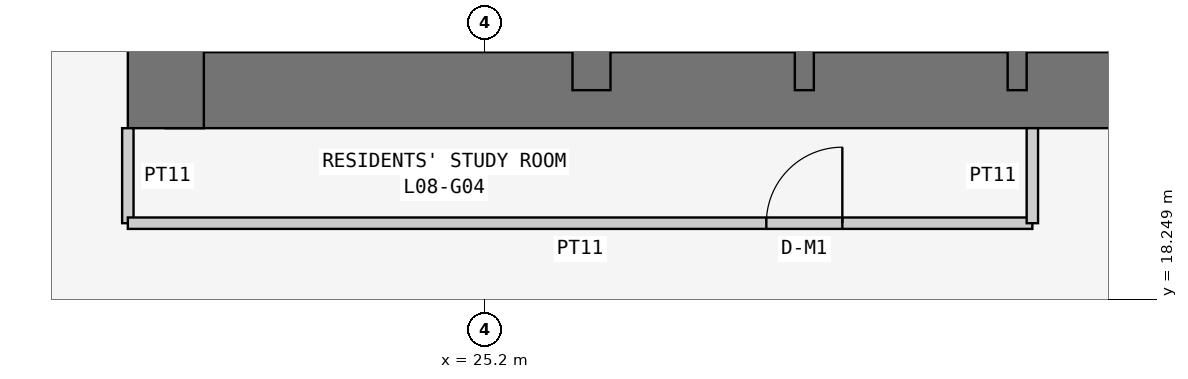
"""IFC4 building model, lengths in metres.
Left out: names, types, materials, properties, quantities, classifications, styles, units other than length and angle.
Written with IfcOpenShell. Run it as: python <this file> out.ifc"""

import sys

from ifc_helpers import new_model, si_unit, direction, frame, frame_2d, origin, place, context, subcontext, project, spatial, rectangle, extrude, element, fill, save


model = new_model("IFC4")
c1 = context("Model", 3, precision=1e-05, world=origin(), true_north=direction((0.0, 1.0)))
c2 = subcontext(c1, "Body", "Model", "MODEL_VIEW")
j1 = project(units=[si_unit("LENGTHUNIT", "METRE"), si_unit("PLANEANGLEUNIT", "RADIAN")], contexts=[c1])
p1 = place(None, origin())
s1 = spatial("IfcSite", under=j1, at=p1, CompositionType="ELEMENT")
p2 = place(p1, origin())
s2 = spatial("IfcBuilding", under=s1, at=p2, CompositionType="ELEMENT")
p3 = place(p2, frame((0.0, 0.0, 38.1)))
s3 = spatial("IfcBuildingStorey", under=s2, at=p3, CompositionType="ELEMENT", Elevation=38.1)
p4 = place(p3, frame((21.0, 21.0, 0.0), z_axis=(0.0, 0.0, 1.0), x_axis=(1.0, 0.0, 0.0)))
e1 = element("IfcWall", 1, at=p4, inside=s3, PredefinedType="SHEAR", context=c2, shape_type="SweptSolid", body=[
    extrude(rectangle(XDim=17.3, YDim=1.0, at=frame_2d((8.65, 0.0))), origin(), (0.0, 0.0, 1.0), 3.6),
])
p5 = place(p3, frame((21.0, 37.8, 0.0), z_axis=(0.0, 0.0, 1.0), x_axis=(0.0, -1.0, 0.0)))
e2 = element("IfcWall", 2, at=p5, inside=s3, PredefinedType="SHEAR", context=c2, shape_type="SweptSolid", body=[
    extrude(rectangle(XDim=17.3, YDim=1.0, at=frame_2d((8.65, 0.0))), origin(), (0.0, 0.0, 1.0), 3.6),
])
p6 = place(p5, frame((5.4, 0.0, 0.0)))
e3 = element("IfcOpeningElement", 3, at=p6, cuts=e2, PredefinedType="OPENING", context=c2, shape_type="SweptSolid", body=[
    extrude(rectangle(XDim=1.2, YDim=2.1, at=frame_2d((0.6, 1.05))), frame((0.0, 0.51, 0.0), z_axis=(0.0, -1.0, 0.0), x_axis=(1.0, 0.0, 0.0)), (0.0, 0.0, 1.0), 1.02),
])
p7 = place(p3, frame((26.6, 21.0, 0.0), z_axis=(0.0, 0.0, 1.0), x_axis=(0.0, 1.0, 0.0)))
e4 = element("IfcWall", 4, at=p7, inside=s3, PredefinedType="SHEAR", context=c2, shape_type="SweptSolid", body=[
    extrude(rectangle(XDim=16.8, YDim=0.5, at=frame_2d((8.4, 0.0))), origin(), (0.0, 0.0, 1.0), 3.6),
])
p8 = place(p7, frame((10.4, 0.0, 0.0)))
e5 = element("IfcOpeningElement", 5, at=p8, cuts=e4, PredefinedType="OPENING", context=c2, shape_type="SweptSolid", body=[
    extrude(rectangle(XDim=1.2, YDim=2.1, at=frame_2d((0.6, 1.05))), frame((0.0, 0.26, 0.0), z_axis=(0.0, -1.0, 0.0), x_axis=(1.0, 0.0, 0.0)), (0.0, 0.0, 1.0), 0.52),
])
for number, where, z_axis, x_axis in (
    (6, (29.4, 21.0, 0.0), (0.0, 0.0, 1.0), (0.0, 1.0, 0.0)),
    (7, (32.2, 21.0, 0.0), (0.0, 0.0, 1.0), (0.0, 1.0, 0.0)),
):
    element("IfcWall", number, at=place(p3, frame(where, z_axis=z_axis, x_axis=x_axis)), inside=s3, PredefinedType="SHEAR", context=c2, shape_type="SweptSolid", body=[
        extrude(rectangle(XDim=3.2, YDim=0.25, at=frame_2d((1.6, 0.0))), origin(), (0.0, 0.0, 1.0), 3.6),
    ])
p9 = place(p3, frame((20.5, 20.5, 0.0), z_axis=(0.0, 0.0, 1.0), x_axis=(0.0, -1.0, 0.0)))
e8 = element("IfcWall", 8, at=p9, inside=s3, PredefinedType="PARTITIONING", context=c2, shape_type="SweptSolid", body=[
    extrude(rectangle(XDim=1.25, YDim=0.15, at=frame_2d((0.625, 0.0))), origin(), (0.0, 0.0, 1.0), 3.45),
])
p10 = place(p3, frame((20.5, 19.25, 0.0), z_axis=(0.0, 0.0, 1.0), x_axis=(1.0, 0.0, 0.0)))
e9 = element("IfcWall", 9, at=p10, inside=s3, PredefinedType="PARTITIONING", context=c2, shape_type="SweptSolid", body=[
    extrude(rectangle(XDim=11.9, YDim=0.15, at=frame_2d((5.95, 0.0))), origin(), (0.0, 0.0, 1.0), 3.45),
])
p11 = place(p10, frame((8.4, 0.0, 0.0)))
e10 = element("IfcOpeningElement", 10, at=p11, cuts=e9, PredefinedType="OPENING", context=c2, shape_type="SweptSolid", body=[
    extrude(rectangle(XDim=1.0, YDim=2.1, at=frame_2d((0.5, 1.05))), frame((0.0, 0.085, 0.0), z_axis=(0.0, -1.0, 0.0), x_axis=(1.0, 0.0, 0.0)), (0.0, 0.0, 1.0), 0.17),
])
p12 = place(p3, frame((32.4, 19.25, 0.0), z_axis=(0.0, 0.0, 1.0), x_axis=(0.0, 1.0, 0.0)))
e11 = element("IfcWall", 11, at=p12, inside=s3, PredefinedType="PARTITIONING", context=c2, shape_type="SweptSolid", body=[
    extrude(rectangle(XDim=1.25, YDim=0.15, at=frame_2d((0.625, 0.0))), origin(), (0.0, 0.0, 1.0), 3.45),
])
p13 = place(p11, origin())
e12 = element("IfcDoor", 12, at=p13, inside=s3, OperationType="SINGLE_SWING_RIGHT", PredefinedType="DOOR", context=c2, shape_type="SweptSolid", body=[
    extrude(rectangle(XDim=1.0, YDim=2.1, at=frame_2d((0.5, 1.05))), frame((0.0, 0.025, 0.0), z_axis=(0.0, -1.0, 0.0), x_axis=(1.0, 0.0, 0.0)), (0.0, 0.0, 1.0), 0.05),
])
fill(e10, e12)
save(model, sys.argv[1])
